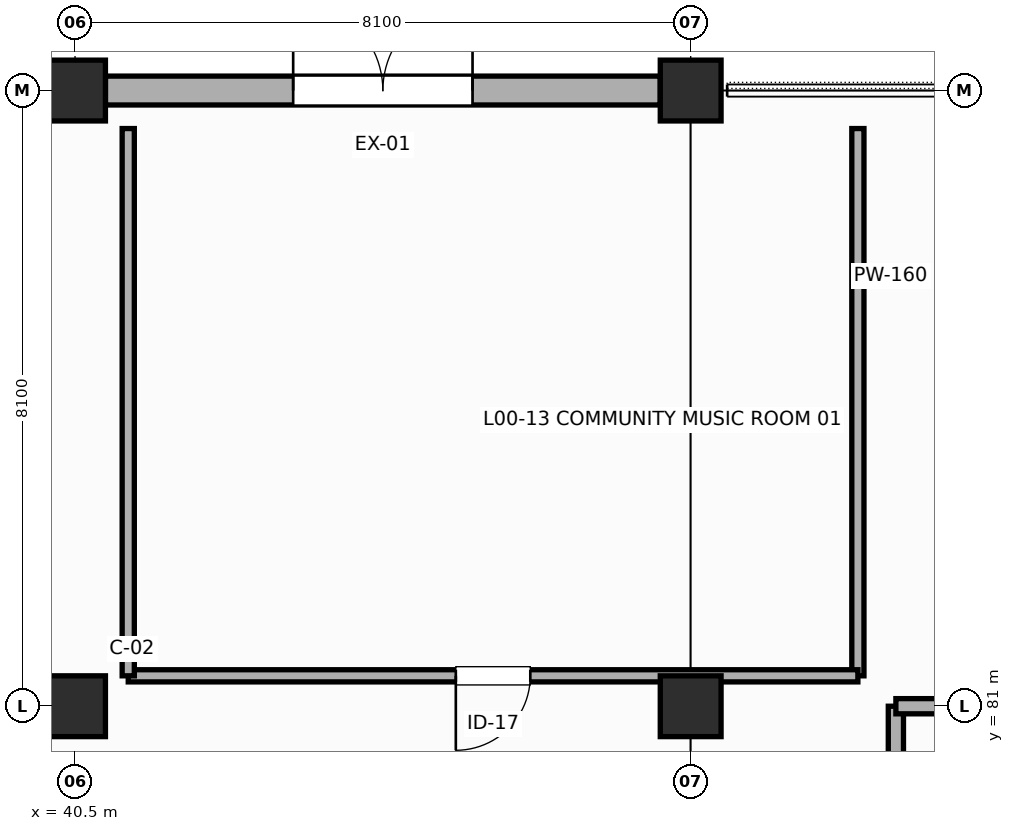
"""IFC4 building model, lengths in metres.
Left out: names, types, materials, properties, quantities, classifications, styles, units other than length and angle.
Written with IfcOpenShell. Run it as: python <this file> out.ifc"""

import sys

from ifc_helpers import new_model, si_unit, direction, frame, frame_2d, origin, origin_2d, place, context, subcontext, project, spatial, rectangle, extrude, element, fill, save


model = new_model("IFC4")
c1 = context("Model", 3, precision=1e-05, world=origin(), true_north=direction((0.0, 1.0)))
c2 = subcontext(c1, "Body", "Model", "MODEL_VIEW")
j1 = project(units=[si_unit("LENGTHUNIT", "METRE"), si_unit("PLANEANGLEUNIT", "RADIAN")], contexts=[c1])
p1 = place(None, origin())
s1 = spatial("IfcSite", under=j1, at=p1, CompositionType="ELEMENT")
p2 = place(p1, origin())
s2 = spatial("IfcBuilding", under=s1, at=p2, CompositionType="ELEMENT")
p3 = place(p2, origin())
s3 = spatial("IfcBuildingStorey", under=s2, at=p3, CompositionType="ELEMENT", Elevation=0.0)
for number, where, z_axis, x_axis in (
    (1, (40.5, 81.0, 0.0), (0.0, 0.0, 1.0), (1.0, 0.0, 0.0)),
    (2, (40.5, 89.1, 0.0), (0.0, 0.0, 1.0), (1.0, 0.0, 0.0)),
    (3, (48.6, 81.0, 0.0), (0.0, 0.0, 1.0), (1.0, 0.0, 0.0)),
    (4, (48.6, 89.1, 0.0), (0.0, 0.0, 1.0), (1.0, 0.0, 0.0)),
):
    element("IfcColumn", number, at=place(p3, frame(where, z_axis=z_axis, x_axis=x_axis)), inside=s3, PredefinedType="COLUMN", context=c2, shape_type="SweptSolid", body=[
        extrude(rectangle(XDim=0.8, YDim=0.8, at=origin_2d()), origin(), (0.0, 0.0, 1.0), 5.4),
    ])
p4 = place(p3, frame((40.9, 89.1, 0.0), z_axis=(0.0, 0.0, 1.0), x_axis=(1.0, 0.0, 0.0)))
e5 = element("IfcWall", 5, at=p4, inside=s3, PredefinedType="SOLIDWALL", context=c2, shape_type="SweptSolid", body=[
    extrude(rectangle(XDim=7.3, YDim=0.38, at=frame_2d((3.65, 0.0))), origin(), (0.0, 0.0, 1.0), 4.675),
])
p5 = place(p4, frame((2.47, 0.0, 0.0)))
e6 = element("IfcOpeningElement", 6, at=p5, cuts=e5, PredefinedType="OPENING", context=c2, shape_type="SweptSolid", body=[
    extrude(rectangle(XDim=2.36, YDim=2.4, at=frame_2d((1.18, 1.2))), frame((0.0, 0.2, 0.0), z_axis=(0.0, -1.0, 0.0), x_axis=(1.0, 0.0, 0.0)), (0.0, 0.0, 1.0), 0.4),
])
p6 = place(p3, frame((51.3, 72.9, 0.0), z_axis=(0.0, 0.0, 1.0), x_axis=(0.0, 1.0, 0.0)))
e7 = element("IfcWall", 7, at=p6, inside=s3, PredefinedType="PARTITIONING", context=c2, shape_type="SweptSolid", body=[
    extrude(rectangle(XDim=8.1, YDim=0.2, at=frame_2d((4.05, 0.0))), origin(), (0.0, 0.0, 1.0), 5.1),
])
p7 = place(p6, frame((3.15, 0.0, 0.0)))
e8 = element("IfcOpeningElement", 8, at=p7, cuts=e7, PredefinedType="OPENING", context=c2, shape_type="SweptSolid", body=[
    extrude(rectangle(XDim=1.8, YDim=2.25, at=frame_2d((0.9, 1.125))), frame((0.0, 0.11, 0.0), z_axis=(0.0, -1.0, 0.0), x_axis=(1.0, 0.0, 0.0)), (0.0, 0.0, 1.0), 0.22),
])
p8 = place(p3, frame((51.3, 81.0, 0.0), z_axis=(0.0, 0.0, 1.0), x_axis=(1.0, 0.0, 0.0)))
e9 = element("IfcWall", 9, at=p8, inside=s3, PredefinedType="PARTITIONING", context=c2, shape_type="SweptSolid", body=[
    extrude(rectangle(XDim=5.0, YDim=0.2, at=frame_2d((2.5, 0.0))), origin(), (0.0, 0.0, 1.0), 4.611),
])
p9 = place(p3, frame((50.8, 88.6, 0.0), z_axis=(0.0, 0.0, 1.0), x_axis=(0.0, -1.0, 0.0)))
e10 = element("IfcWall", 10, at=p9, inside=s3, PredefinedType="PARTITIONING", context=c2, shape_type="SweptSolid", body=[
    extrude(rectangle(XDim=7.2, YDim=0.16, at=frame_2d((3.6, 0.0))), origin(), (0.0, 0.0, 1.0), 5.12),
])
p10 = place(p3, frame((50.8, 81.4, 0.0), z_axis=(0.0, 0.0, 1.0), x_axis=(-1.0, 0.0, 0.0)))
e11 = element("IfcWall", 11, at=p10, inside=s3, PredefinedType="PARTITIONING", context=c2, shape_type="SweptSolid", body=[
    extrude(rectangle(XDim=9.6, YDim=0.16, at=frame_2d((4.8, 0.0))), origin(), (0.0, 0.0, 1.0), 5.12),
])
p11 = place(p10, frame((4.31, 0.0, 0.0)))
e12 = element("IfcOpeningElement", 12, at=p11, cuts=e11, PredefinedType="OPENING", context=c2, shape_type="SweptSolid", body=[
    extrude(rectangle(XDim=0.98, YDim=2.2, at=frame_2d((0.49, 1.1))), frame((0.0, 0.09, 0.0), z_axis=(0.0, -1.0, 0.0), x_axis=(1.0, 0.0, 0.0)), (0.0, 0.0, 1.0), 0.18),
])
p12 = place(p3, frame((41.2, 81.4, 0.0), z_axis=(0.0, 0.0, 1.0), x_axis=(0.0, 1.0, 0.0)))
e13 = element("IfcWall", 13, at=p12, inside=s3, PredefinedType="PARTITIONING", context=c2, shape_type="SweptSolid", body=[
    extrude(rectangle(XDim=7.2, YDim=0.16, at=frame_2d((3.6, 0.0))), origin(), (0.0, 0.0, 1.0), 5.12),
])
p13 = place(p5, origin())
e14 = element("IfcDoor", 14, at=p13, inside=s3, OperationType="DOUBLE_DOOR_SINGLE_SWING", PredefinedType="DOOR", context=c2, shape_type="SweptSolid", body=[
    extrude(rectangle(XDim=2.36, YDim=2.4, at=frame_2d((1.18, 1.2))), frame((0.0, 0.025, 0.0), z_axis=(0.0, -1.0, 0.0), x_axis=(1.0, 0.0, 0.0)), (0.0, 0.0, 1.0), 0.05),
])
fill(e6, e14)
p14 = place(p11, origin())
e15 = element("IfcDoor", 15, at=p14, inside=s3, OperationType="SINGLE_SWING_RIGHT", PredefinedType="DOOR", context=c2, shape_type="SweptSolid", body=[
    extrude(rectangle(XDim=0.98, YDim=2.2, at=frame_2d((0.49, 1.1))), frame((0.0, 0.025, 0.0), z_axis=(0.0, -1.0, 0.0), x_axis=(1.0, 0.0, 0.0)), (0.0, 0.0, 1.0), 0.05),
])
fill(e12, e15)
save(model, sys.argv[1])
